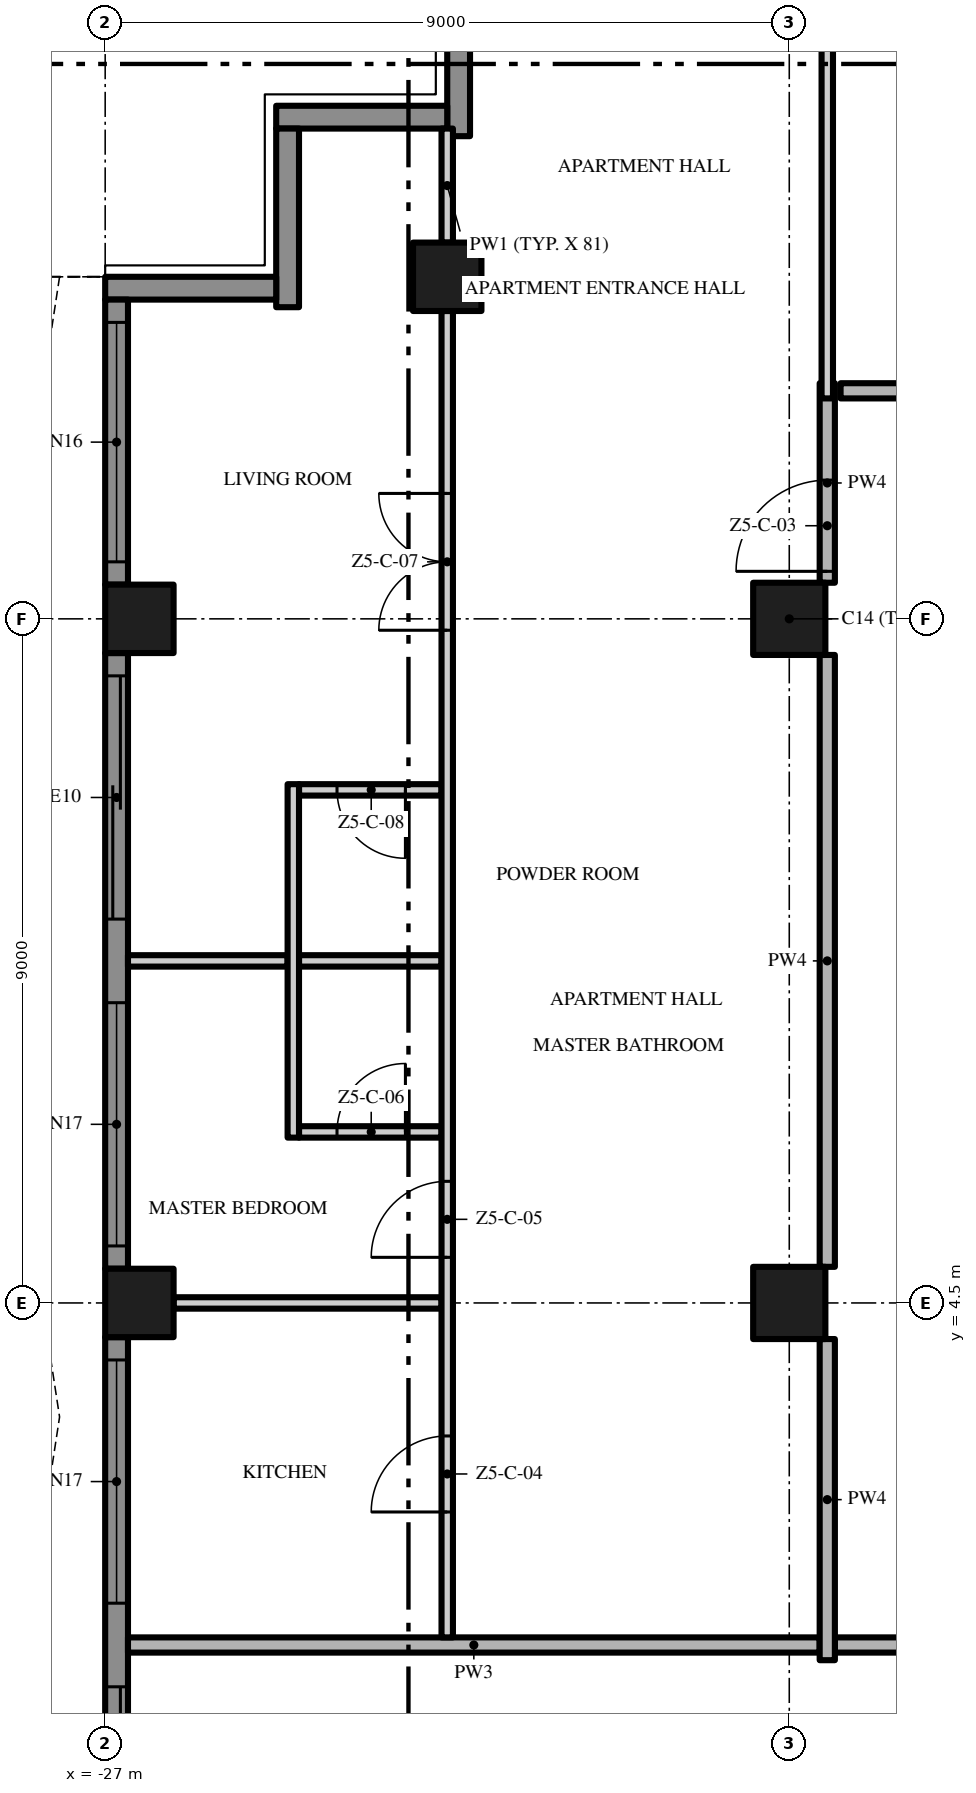
"""IFC4 building model, lengths in metres.
Left out: names, types, materials, properties, quantities, classifications, styles, units other than length and angle.
Written with IfcOpenShell. Run it as: python <this file> out.ifc"""

import sys

from ifc_helpers import new_model, si_unit, direction, frame, frame_2d, origin, origin_2d, place, context, subcontext, project, spatial, polyline, rectangle, outline, extrude, element, fill, save


model = new_model("IFC4")
c1 = context("Model", 3, precision=1e-05, world=origin(), true_north=direction((0.0, 1.0)))
c2 = subcontext(c1, "Body", "Model", "MODEL_VIEW")
j1 = project(units=[si_unit("LENGTHUNIT", "METRE"), si_unit("PLANEANGLEUNIT", "RADIAN")], contexts=[c1])
p1 = place(None, origin())
s1 = spatial("IfcSite", under=j1, at=p1, CompositionType="ELEMENT")
p2 = place(p1, origin())
s2 = spatial("IfcBuilding", under=s1, at=p2, CompositionType="ELEMENT")
p3 = place(p2, frame((0.0, 0.0, 265.4)))
s3 = spatial("IfcBuildingStorey", under=s2, at=p3, CompositionType="ELEMENT", Elevation=265.4)
for number, where, z_axis, x_axis in (
    (1, (-18.0, 13.5, 0.0), (0.0, 0.0, 1.0), (1.0, 0.0, 0.0)),
    (2, (-18.0, 4.5, 0.0), (0.0, 0.0, 1.0), (1.0, 0.0, 0.0)),
):
    element("IfcColumn", number, at=place(p3, frame(where, z_axis=z_axis, x_axis=x_axis)), inside=s3, PredefinedType="COLUMN", context=c2, shape_type="SweptSolid", body=[
        extrude(rectangle(XDim=0.95, YDim=0.95, at=origin_2d()), origin(), (0.0, 0.0, 1.0), 3.5),
    ])
for number, where, z_axis, x_axis in (
    (3, (-26.55, 13.5, 0.0), (0.0, 0.0, 1.0), (1.0, 0.0, 0.0)),
    (4, (-22.5, 18.0, 0.0), (0.0, 0.0, 1.0), (1.0, 0.0, 0.0)),
    (5, (-26.55, 4.5, 0.0), (0.0, 0.0, 1.0), (1.0, 0.0, 0.0)),
):
    element("IfcColumn", number, at=place(p3, frame(where, z_axis=z_axis, x_axis=x_axis)), inside=s3, PredefinedType="COLUMN", context=c2, shape_type="SweptSolid", body=[
        extrude(rectangle(XDim=0.9, YDim=0.9, at=origin_2d()), origin(), (0.0, 0.0, 1.0), 3.5),
    ])
p4 = place(p3, frame((-22.35, 19.85, 0.0), z_axis=(0.0, 0.0, 1.0), x_axis=(0.0, 1.0, 0.0)))
e6 = element("IfcWall", 6, at=p4, inside=s3, PredefinedType="SOLIDWALL", context=c2, shape_type="SweptSolid", body=[
    extrude(rectangle(XDim=2.35, YDim=0.3, at=frame_2d((1.175, 0.0))), origin(), (0.0, 0.0, 1.0), 3.5),
])
p5 = place(p3, frame((-24.75, 20.1, 0.0), z_axis=(0.0, 0.0, 1.0), x_axis=(1.0, 0.0, 0.0)))
e7 = element("IfcWall", 7, at=p5, inside=s3, PredefinedType="SOLIDWALL", context=c2, shape_type="SweptSolid", body=[
    extrude(rectangle(XDim=2.25, YDim=0.3, at=frame_2d((1.125, 0.0))), origin(), (0.0, 0.0, 1.0), 3.5),
])
p6 = place(p3, frame((-24.6, 17.6, 0.0), z_axis=(0.0, 0.0, 1.0), x_axis=(0.0, 1.0, 0.0)))
e8 = element("IfcWall", 8, at=p6, inside=s3, PredefinedType="SOLIDWALL", context=c2, shape_type="SweptSolid", body=[
    extrude(rectangle(XDim=2.35, YDim=0.3, at=frame_2d((1.175, 0.0))), origin(), (0.0, 0.0, 1.0), 3.5),
])
p7 = place(p3, frame((-27.0, 17.85, 0.0), z_axis=(0.0, 0.0, 1.0), x_axis=(1.0, 0.0, 0.0)))
e9 = element("IfcWall", 9, at=p7, inside=s3, PredefinedType="SOLIDWALL", context=c2, shape_type="SweptSolid", body=[
    extrude(rectangle(XDim=2.25, YDim=0.3, at=frame_2d((1.125, 0.0))), origin(), (0.0, 0.0, 1.0), 3.5),
])
p8 = place(p3, frame((-26.85, 13.95, 0.0), z_axis=(0.0, 0.0, 1.0), x_axis=(0.0, 1.0, 0.0)))
e10 = element("IfcWall", 10, at=p8, inside=s3, PredefinedType="SOLIDWALL", context=c2, shape_type="SweptSolid", body=[
    extrude(rectangle(XDim=3.75, YDim=0.3, at=frame_2d((1.875, 0.0))), origin(), (0.0, 0.0, 1.0), 3.5),
])
p9 = place(p8, frame((0.3, 0.0, 0.45)))
e11 = element("IfcOpeningElement", 11, at=p9, cuts=e10, PredefinedType="OPENING", context=c2, shape_type="SweptSolid", body=[
    extrude(rectangle(XDim=3.15, YDim=2.65, at=frame_2d((1.575, 1.325))), frame((0.0, 0.16, 0.0), z_axis=(0.0, -1.0, 0.0), x_axis=(1.0, 0.0, 0.0)), (0.0, 0.0, 1.0), 0.32),
])
p10 = place(p3, frame((-26.85, 4.95, 0.0), z_axis=(0.0, 0.0, 1.0), x_axis=(0.0, 1.0, 0.0)))
e12 = element("IfcWall", 12, at=p10, inside=s3, PredefinedType="SOLIDWALL", context=c2, shape_type="SweptSolid", body=[
    extrude(rectangle(XDim=8.1, YDim=0.3, at=frame_2d((4.05, 0.0))), origin(), (0.0, 0.0, 1.0), 3.5),
])
p11 = place(p10, frame((4.6, 0.0, 0.0)))
e13 = element("IfcOpeningElement", 13, at=p11, cuts=e12, PredefinedType="OPENING", context=c2, shape_type="SweptSolid", body=[
    extrude(rectangle(XDim=3.2, YDim=2.4, at=frame_2d((1.6, 1.2))), frame((0.0, 0.16, 0.0), z_axis=(0.0, -1.0, 0.0), x_axis=(1.0, 0.0, 0.0)), (0.0, 0.0, 1.0), 0.32),
])
p12 = place(p10, frame((0.3, 0.0, 0.45)))
e14 = element("IfcOpeningElement", 14, at=p12, cuts=e12, PredefinedType="OPENING", context=c2, shape_type="SweptSolid", body=[
    extrude(rectangle(XDim=3.2, YDim=2.65, at=frame_2d((1.6, 1.325))), frame((0.0, 0.16, 0.0), z_axis=(0.0, -1.0, 0.0), x_axis=(1.0, 0.0, 0.0)), (0.0, 0.0, 1.0), 0.32),
])
p13 = place(p3, frame((-26.85, -4.05, 0.0), z_axis=(0.0, 0.0, 1.0), x_axis=(0.0, 1.0, 0.0)))
e15 = element("IfcWall", 15, at=p13, inside=s3, PredefinedType="SOLIDWALL", context=c2, shape_type="SweptSolid", body=[
    extrude(rectangle(XDim=8.1, YDim=0.3, at=frame_2d((4.05, 0.0))), origin(), (0.0, 0.0, 1.0), 3.5),
])
p14 = place(p13, frame((4.6, 0.0, 0.45)))
e16 = element("IfcOpeningElement", 16, at=p14, cuts=e15, PredefinedType="OPENING", context=c2, shape_type="SweptSolid", body=[
    extrude(rectangle(XDim=3.2, YDim=2.65, at=frame_2d((1.6, 1.325))), frame((0.0, 0.16, 0.0), z_axis=(0.0, -1.0, 0.0), x_axis=(1.0, 0.0, 0.0)), (0.0, 0.0, 1.0), 0.32),
])
p15 = place(p13, frame((0.3, 0.0, 0.0)))
e17 = element("IfcOpeningElement", 17, at=p15, cuts=e15, PredefinedType="OPENING", context=c2, shape_type="SweptSolid", body=[
    extrude(rectangle(XDim=3.2, YDim=2.4, at=frame_2d((1.6, 1.2))), frame((0.0, 0.16, 0.0), z_axis=(0.0, -1.0, 0.0), x_axis=(1.0, 0.0, 0.0)), (0.0, 0.0, 1.0), 0.32),
])
p16 = place(p3, origin())
e18 = element("IfcWall", 18, at=p16, inside=s3, PredefinedType="USERDEFINED", context=c2, shape_type="SweptSolid", body=[
    extrude(outline(polyline([(-27.6, 18.0), (-27.829, 16.5), (-28.429, 15.0), (-29.171, 13.5), (-29.771, 12.0), (-30.0, 10.5), (-29.771, 9.0), (-29.171, 7.5), (-28.429, 6.0), (-27.829, 4.5), (-27.6, 3.0), (-27.829, 1.5), (-28.429, 0.0), (-29.171, -1.5), (-29.771, -3.0), (-30.0, -4.5), (-29.771, -6.0), (-29.171, -7.5), (-28.429, -9.0), (-27.829, -10.5), (-27.6, -12.0), (-27.829, -13.5), (-28.429, -15.0), (-29.171, -16.5), (-29.771, -18.0), (-29.539, -18.093), (-28.942, -16.602), (-28.201, -15.102), (-27.586, -13.566), (-27.347, -12.0), (-27.586, -10.434), (-28.201, -8.898), (-28.942, -7.398), (-29.528, -5.934), (-29.747, -4.5), (-29.528, -3.066), (-28.942, -1.602), (-28.201, -0.102), (-27.586, 1.434), (-27.347, 3.0), (-27.586, 4.566), (-28.201, 6.102), (-28.942, 7.602), (-29.528, 9.066), (-29.747, 10.5), (-29.528, 11.934), (-28.942, 13.398), (-28.201, 14.898), (-27.586, 16.434), (-27.353, 17.962), (-27.6, 18.0)])), origin(), (0.0, 0.0, 1.0), 0.9),
])
p17 = place(p3, frame((17.4, 0.0, 0.0), z_axis=(0.0, 0.0, 1.0), x_axis=(-1.0, 0.0, 0.0)))
e19 = element("IfcWall", 19, at=p17, inside=s3, PredefinedType="PARTITIONING", context=c2, shape_type="SweptSolid", body=[
    extrude(rectangle(XDim=34.8, YDim=0.2, at=frame_2d((17.4, 0.0))), origin(), (0.0, 0.0, 1.0), 3.5),
])
p18 = place(p17, frame((23.4, 0.0, 0.0)))
e20 = element("IfcOpeningElement", 20, at=p18, cuts=e19, PredefinedType="OPENING", context=c2, shape_type="SweptSolid", body=[
    extrude(rectangle(XDim=1.5, YDim=2.4, at=frame_2d((0.75, 1.2))), frame((0.0, 0.11, 0.0), z_axis=(0.0, -1.0, 0.0), x_axis=(1.0, 0.0, 0.0)), (0.0, 0.0, 1.0), 0.22),
])
p19 = place(p17, frame((5.4, 0.0, 0.0)))
e21 = element("IfcOpeningElement", 21, at=p19, cuts=e19, PredefinedType="OPENING", context=c2, shape_type="SweptSolid", body=[
    extrude(rectangle(XDim=1.5, YDim=2.4, at=frame_2d((0.75, 1.2))), frame((0.0, 0.11, 0.0), z_axis=(0.0, -1.0, 0.0), x_axis=(1.0, 0.0, 0.0)), (0.0, 0.0, 1.0), 0.22),
])
p20 = place(p3, frame((-26.7, 0.0, 0.0), z_axis=(0.0, 0.0, 1.0), x_axis=(1.0, 0.0, 0.0)))
e22 = element("IfcWall", 22, at=p20, inside=s3, PredefinedType="PARTITIONING", context=c2, shape_type="SweptSolid", body=[
    extrude(rectangle(XDim=9.1, YDim=0.2, at=frame_2d((4.55, 0.0))), origin(), (0.0, 0.0, 1.0), 3.5),
])
p21 = place(p3, frame((-26.1, 4.5, 0.0), z_axis=(0.0, 0.0, 1.0), x_axis=(1.0, 0.0, 0.0)))
e23 = element("IfcWall", 23, at=p21, inside=s3, PredefinedType="PARTITIONING", context=c2, shape_type="SweptSolid", body=[
    extrude(rectangle(XDim=3.525, YDim=0.15, at=frame_2d((1.762, 0.0))), origin(), (0.0, 0.0, 1.0), 3.5),
])
p22 = place(p3, frame((-24.45, 6.75, 0.0), z_axis=(0.0, 0.0, 1.0), x_axis=(1.0, 0.0, 0.0)))
e24 = element("IfcWall", 24, at=p22, inside=s3, PredefinedType="PARTITIONING", context=c2, shape_type="SweptSolid", body=[
    extrude(rectangle(XDim=1.875, YDim=0.15, at=frame_2d((0.938, 0.0))), origin(), (0.0, 0.0, 1.0), 3.5),
])
p23 = place(p22, frame((0.5, 0.0, 0.0)))
e25 = element("IfcOpeningElement", 25, at=p23, cuts=e24, PredefinedType="OPENING", context=c2, shape_type="SweptSolid", body=[
    extrude(rectangle(XDim=0.9, YDim=2.1, at=frame_2d((0.45, 1.05))), frame((0.0, 0.085, 0.0), z_axis=(0.0, -1.0, 0.0), x_axis=(1.0, 0.0, 0.0)), (0.0, 0.0, 1.0), 0.17),
])
p24 = place(p3, frame((-26.7, 9.0, 0.0), z_axis=(0.0, 0.0, 1.0), x_axis=(1.0, 0.0, 0.0)))
e26 = element("IfcWall", 26, at=p24, inside=s3, PredefinedType="PARTITIONING", context=c2, shape_type="SweptSolid", body=[
    extrude(rectangle(XDim=2.1, YDim=0.15, at=frame_2d((1.05, 0.0))), origin(), (0.0, 0.0, 1.0), 3.5),
])
p25 = place(p3, frame((-24.45, 9.0, 0.0), z_axis=(0.0, 0.0, 1.0), x_axis=(1.0, 0.0, 0.0)))
e27 = element("IfcWall", 27, at=p25, inside=s3, PredefinedType="PARTITIONING", context=c2, shape_type="SweptSolid", body=[
    extrude(rectangle(XDim=1.875, YDim=0.15, at=frame_2d((0.938, 0.0))), origin(), (0.0, 0.0, 1.0), 3.5),
])
p26 = place(p3, frame((-22.575, 11.25, 0.0), z_axis=(0.0, 0.0, 1.0), x_axis=(-1.0, 0.0, 0.0)))
e28 = element("IfcWall", 28, at=p26, inside=s3, PredefinedType="PARTITIONING", context=c2, shape_type="SweptSolid", body=[
    extrude(rectangle(XDim=1.875, YDim=0.15, at=frame_2d((0.938, 0.0))), origin(), (0.0, 0.0, 1.0), 3.5),
])
p27 = place(p26, frame((0.475, 0.0, 0.0)))
e29 = element("IfcOpeningElement", 29, at=p27, cuts=e28, PredefinedType="OPENING", context=c2, shape_type="SweptSolid", body=[
    extrude(rectangle(XDim=0.9, YDim=2.1, at=frame_2d((0.45, 1.05))), frame((0.0, 0.085, 0.0), z_axis=(0.0, -1.0, 0.0), x_axis=(1.0, 0.0, 0.0)), (0.0, 0.0, 1.0), 0.17),
])
p28 = place(p3, frame((-17.325, 16.5, 0.0), z_axis=(0.0, 0.0, 1.0), x_axis=(1.0, 0.0, 0.0)))
e30 = element("IfcWall", 30, at=p28, inside=s3, PredefinedType="PARTITIONING", context=c2, shape_type="SweptSolid", body=[
    extrude(rectangle(XDim=3.825, YDim=0.2, at=frame_2d((1.913, 0.0))), origin(), (0.0, 0.0, 1.0), 3.5),
])
p29 = place(p28, frame((1.35, 0.0, 0.0)))
e31 = element("IfcOpeningElement", 31, at=p29, cuts=e30, PredefinedType="OPENING", context=c2, shape_type="SweptSolid", body=[
    extrude(rectangle(XDim=0.9, YDim=2.1, at=frame_2d((0.45, 1.05))), frame((0.0, 0.11, 0.0), z_axis=(0.0, -1.0, 0.0), x_axis=(1.0, 0.0, 0.0)), (0.0, 0.0, 1.0), 0.22),
])
p30 = place(p3, frame((-24.525, 6.675, 0.0), z_axis=(0.0, 0.0, 1.0), x_axis=(0.0, 1.0, 0.0)))
e32 = element("IfcWall", 32, at=p30, inside=s3, PredefinedType="PARTITIONING", context=c2, shape_type="SweptSolid", body=[
    extrude(rectangle(XDim=4.65, YDim=0.15, at=frame_2d((2.325, 0.0))), origin(), (0.0, 0.0, 1.0), 3.5),
])
p31 = place(p3, frame((-22.5, 0.1, 0.0), z_axis=(0.0, 0.0, 1.0), x_axis=(0.0, 1.0, 0.0)))
e33 = element("IfcWall", 33, at=p31, inside=s3, PredefinedType="PARTITIONING", context=c2, shape_type="SweptSolid", body=[
    extrude(rectangle(XDim=17.45, YDim=0.15, at=frame_2d((8.725, 0.0))), origin(), (0.0, 0.0, 1.0), 3.5),
])
p32 = place(p31, frame((1.65, 0.0, 0.0)))
e34 = element("IfcOpeningElement", 34, at=p32, cuts=e33, PredefinedType="OPENING", context=c2, shape_type="SweptSolid", body=[
    extrude(rectangle(XDim=1.0, YDim=2.4, at=frame_2d((0.5, 1.2))), frame((0.0, 0.085, 0.0), z_axis=(0.0, -1.0, 0.0), x_axis=(1.0, 0.0, 0.0)), (0.0, 0.0, 1.0), 0.17),
])
p33 = place(p31, frame((5.0, 0.0, 0.0)))
e35 = element("IfcOpeningElement", 35, at=p33, cuts=e33, PredefinedType="OPENING", context=c2, shape_type="SweptSolid", body=[
    extrude(rectangle(XDim=1.0, YDim=2.4, at=frame_2d((0.5, 1.2))), frame((0.0, 0.085, 0.0), z_axis=(0.0, -1.0, 0.0), x_axis=(1.0, 0.0, 0.0)), (0.0, 0.0, 1.0), 0.17),
])
p34 = place(p31, frame((13.25, 0.0, 0.0)))
e36 = element("IfcOpeningElement", 36, at=p34, cuts=e33, PredefinedType="OPENING", context=c2, shape_type="SweptSolid", body=[
    extrude(rectangle(XDim=1.8, YDim=2.4, at=frame_2d((0.9, 1.2))), frame((0.0, 0.085, 0.0), z_axis=(0.0, -1.0, 0.0), x_axis=(1.0, 0.0, 0.0)), (0.0, 0.0, 1.0), 0.17),
])
p35 = place(p3, frame((-22.5, 18.45, 0.0), z_axis=(0.0, 0.0, 1.0), x_axis=(0.0, 1.0, 0.0)))
e37 = element("IfcWall", 37, at=p35, inside=s3, PredefinedType="PARTITIONING", context=c2, shape_type="SweptSolid", body=[
    extrude(rectangle(XDim=1.5, YDim=0.15, at=frame_2d((0.75, 0.0))), origin(), (0.0, 0.0, 1.0), 3.5),
])
p36 = place(p3, frame((-17.5, -0.2, 0.0), z_axis=(0.0, 0.0, 1.0), x_axis=(0.0, 1.0, 0.0)))
e38 = element("IfcWall", 38, at=p36, inside=s3, PredefinedType="PARTITIONING", context=c2, shape_type="SweptSolid", body=[
    extrude(rectangle(XDim=4.225, YDim=0.2, at=frame_2d((2.112, 0.0))), origin(), (0.0, 0.0, 1.0), 3.5),
])
p37 = place(p3, frame((-17.5, 4.975, 0.0), z_axis=(0.0, 0.0, 1.0), x_axis=(0.0, 1.0, 0.0)))
e39 = element("IfcWall", 39, at=p37, inside=s3, PredefinedType="PARTITIONING", context=c2, shape_type="SweptSolid", body=[
    extrude(rectangle(XDim=8.05, YDim=0.2, at=frame_2d((4.025, 0.0))), origin(), (0.0, 0.0, 1.0), 3.5),
])
p38 = place(p3, frame((-17.5, 13.975, 0.0), z_axis=(0.0, 0.0, 1.0), x_axis=(0.0, 1.0, 0.0)))
e40 = element("IfcWall", 40, at=p38, inside=s3, PredefinedType="PARTITIONING", context=c2, shape_type="SweptSolid", body=[
    extrude(rectangle(XDim=2.625, YDim=0.2, at=frame_2d((1.312, 0.0))), origin(), (0.0, 0.0, 1.0), 3.5),
])
p39 = place(p38, frame((0.15, 0.0, 0.0)))
e41 = element("IfcOpeningElement", 41, at=p39, cuts=e40, PredefinedType="OPENING", context=c2, shape_type="SweptSolid", body=[
    extrude(rectangle(XDim=1.2, YDim=2.4, at=frame_2d((0.6, 1.2))), frame((0.0, 0.11, 0.0), z_axis=(0.0, -1.0, 0.0), x_axis=(1.0, 0.0, 0.0)), (0.0, 0.0, 1.0), 0.22),
])
p40 = place(p3, frame((-17.5, 16.4, 0.0), z_axis=(0.0, 0.0, 1.0), x_axis=(0.0, 1.0, 0.0)))
e42 = element("IfcWall", 42, at=p40, inside=s3, PredefinedType="PARTITIONING", context=c2, shape_type="SweptSolid", body=[
    extrude(rectangle(XDim=5.2, YDim=0.15, at=frame_2d((2.6, 0.0))), origin(), (0.0, 0.0, 1.0), 3.5),
])
p41 = place(p9, origin())
e43 = element("IfcWindow", 43, at=p41, inside=s3, PartitioningType="SINGLE_PANEL", PredefinedType="WINDOW", context=c2, shape_type="SweptSolid", body=[
    extrude(rectangle(XDim=3.15, YDim=2.65, at=frame_2d((1.575, 1.325))), frame((0.0, 0.03, 0.0), z_axis=(0.0, -1.0, 0.0), x_axis=(1.0, 0.0, 0.0)), (0.0, 0.0, 1.0), 0.06),
])
fill(e11, e43)
p42 = place(p11, origin())
e44 = element("IfcDoor", 44, at=p42, inside=s3, OperationType="SINGLE_SWING_LEFT", PredefinedType="DOOR", context=c2, shape_type="SweptSolid", body=[
    extrude(rectangle(XDim=3.2, YDim=2.4, at=frame_2d((1.6, 1.2))), frame((0.0, 0.025, 0.0), z_axis=(0.0, -1.0, 0.0), x_axis=(1.0, 0.0, 0.0)), (0.0, 0.0, 1.0), 0.05),
])
fill(e13, e44)
p43 = place(p12, origin())
e45 = element("IfcWindow", 45, at=p43, inside=s3, PartitioningType="SINGLE_PANEL", PredefinedType="WINDOW", context=c2, shape_type="SweptSolid", body=[
    extrude(rectangle(XDim=3.2, YDim=2.65, at=frame_2d((1.6, 1.325))), frame((0.0, 0.03, 0.0), z_axis=(0.0, -1.0, 0.0), x_axis=(1.0, 0.0, 0.0)), (0.0, 0.0, 1.0), 0.06),
])
fill(e14, e45)
p44 = place(p14, origin())
e46 = element("IfcWindow", 46, at=p44, inside=s3, PartitioningType="SINGLE_PANEL", PredefinedType="WINDOW", context=c2, shape_type="SweptSolid", body=[
    extrude(rectangle(XDim=3.2, YDim=2.65, at=frame_2d((1.6, 1.325))), frame((0.0, 0.03, 0.0), z_axis=(0.0, -1.0, 0.0), x_axis=(1.0, 0.0, 0.0)), (0.0, 0.0, 1.0), 0.06),
])
fill(e16, e46)
p45 = place(p15, origin())
e47 = element("IfcDoor", 47, at=p45, inside=s3, OperationType="SINGLE_SWING_LEFT", PredefinedType="DOOR", context=c2, shape_type="SweptSolid", body=[
    extrude(rectangle(XDim=3.2, YDim=2.4, at=frame_2d((1.6, 1.2))), frame((0.0, 0.025, 0.0), z_axis=(0.0, -1.0, 0.0), x_axis=(1.0, 0.0, 0.0)), (0.0, 0.0, 1.0), 0.05),
])
fill(e17, e47)
p46 = place(p39, origin())
e48 = element("IfcDoor", 48, at=p46, inside=s3, OperationType="SINGLE_SWING_LEFT", PredefinedType="DOOR", context=c2, shape_type="SweptSolid", body=[
    extrude(rectangle(XDim=1.2, YDim=2.4, at=frame_2d((0.6, 1.2))), frame((0.0, 0.025, 0.0), z_axis=(0.0, -1.0, 0.0), x_axis=(1.0, 0.0, 0.0)), (0.0, 0.0, 1.0), 0.05),
])
fill(e41, e48)
p47 = place(p32, origin())
e49 = element("IfcDoor", 49, at=p47, inside=s3, OperationType="SINGLE_SWING_LEFT", PredefinedType="DOOR", context=c2, shape_type="SweptSolid", body=[
    extrude(rectangle(XDim=1.0, YDim=2.4, at=frame_2d((0.5, 1.2))), frame((0.0, 0.025, 0.0), z_axis=(0.0, -1.0, 0.0), x_axis=(1.0, 0.0, 0.0)), (0.0, 0.0, 1.0), 0.05),
])
fill(e34, e49)
p48 = place(p33, origin())
e50 = element("IfcDoor", 50, at=p48, inside=s3, OperationType="SINGLE_SWING_LEFT", PredefinedType="DOOR", context=c2, shape_type="SweptSolid", body=[
    extrude(rectangle(XDim=1.0, YDim=2.4, at=frame_2d((0.5, 1.2))), frame((0.0, 0.025, 0.0), z_axis=(0.0, -1.0, 0.0), x_axis=(1.0, 0.0, 0.0)), (0.0, 0.0, 1.0), 0.05),
])
fill(e35, e50)
p49 = place(p23, origin())
e51 = element("IfcDoor", 51, at=p49, inside=s3, OperationType="SINGLE_SWING_RIGHT", PredefinedType="DOOR", context=c2, shape_type="SweptSolid", body=[
    extrude(rectangle(XDim=0.9, YDim=2.1, at=frame_2d((0.45, 1.05))), frame((0.0, 0.025, 0.0), z_axis=(0.0, -1.0, 0.0), x_axis=(1.0, 0.0, 0.0)), (0.0, 0.0, 1.0), 0.05),
])
fill(e25, e51)
p50 = place(p34, origin())
e52 = element("IfcDoor", 52, at=p50, inside=s3, OperationType="DOUBLE_DOOR_SINGLE_SWING", PredefinedType="DOOR", context=c2, shape_type="SweptSolid", body=[
    extrude(rectangle(XDim=1.8, YDim=2.4, at=frame_2d((0.9, 1.2))), frame((0.0, 0.025, 0.0), z_axis=(0.0, -1.0, 0.0), x_axis=(1.0, 0.0, 0.0)), (0.0, 0.0, 1.0), 0.05),
])
fill(e36, e52)
p51 = place(p27, origin())
e53 = element("IfcDoor", 53, at=p51, inside=s3, OperationType="SINGLE_SWING_LEFT", PredefinedType="DOOR", context=c2, shape_type="SweptSolid", body=[
    extrude(rectangle(XDim=0.9, YDim=2.1, at=frame_2d((0.45, 1.05))), frame((0.0, 0.025, 0.0), z_axis=(0.0, -1.0, 0.0), x_axis=(1.0, 0.0, 0.0)), (0.0, 0.0, 1.0), 0.05),
])
fill(e29, e53)
save(model, sys.argv[1])
